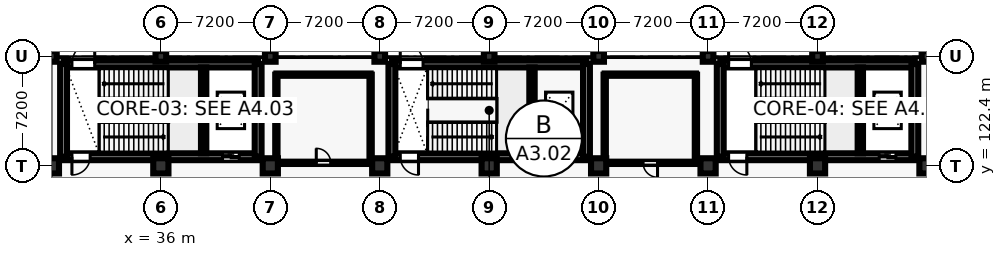
"""IFC4 building model, lengths in metres.
Left out: names, types, materials, properties, quantities, classifications, styles, units other than length and angle.
Written with IfcOpenShell. Run it as: python <this file> out.ifc"""

import sys

from ifc_helpers import new_model, si_unit, direction, frame, frame_2d, origin, origin_2d, place, context, subcontext, project, spatial, rectangle, circle, extrude, element, fill, save


model = new_model("IFC4")
c1 = context("Model", 3, precision=1e-05, world=origin(), true_north=direction((0.0, 1.0)))
c2 = subcontext(c1, "Body", "Model", "MODEL_VIEW")
j1 = project(units=[si_unit("LENGTHUNIT", "METRE"), si_unit("PLANEANGLEUNIT", "RADIAN")], contexts=[c1])
p1 = place(None, origin())
s1 = spatial("IfcSite", under=j1, at=p1, CompositionType="ELEMENT")
p2 = place(p1, origin())
s2 = spatial("IfcBuilding", under=s1, at=p2, CompositionType="ELEMENT")
p3 = place(p2, origin())
s3 = spatial("IfcBuildingStorey", under=s2, at=p3, CompositionType="ELEMENT", Elevation=0.0)
p4 = place(p3, frame((28.8, 122.4, 0.0), z_axis=(0.0, 0.0, 1.0), x_axis=(1.0, 0.0, 0.0)))
e1 = element("IfcColumn", 1, at=p4, inside=s3, PredefinedType="COLUMN", context=c2, shape_type="SweptSolid", body=[
    extrude(circle(Radius=0.5, at=origin_2d()), origin(), (0.0, 0.0, 1.0), 5.4),
])
p5 = place(p3, frame((28.8, 129.6, 0.0), z_axis=(0.0, 0.0, 1.0), x_axis=(1.0, 0.0, 0.0)))
e2 = element("IfcColumn", 2, at=p5, inside=s3, PredefinedType="COLUMN", context=c2, shape_type="SweptSolid", body=[
    extrude(rectangle(XDim=0.7, YDim=0.7, at=origin_2d()), origin(), (0.0, 0.0, 1.0), 5.4),
])
p6 = place(p3, frame((36.0, 122.4, 0.0), z_axis=(0.0, 0.0, 1.0), x_axis=(1.0, 0.0, 0.0)))
e3 = element("IfcColumn", 3, at=p6, inside=s3, PredefinedType="COLUMN", context=c2, shape_type="SweptSolid", body=[
    extrude(circle(Radius=0.5, at=origin_2d()), origin(), (0.0, 0.0, 1.0), 5.4),
])
p7 = place(p3, frame((36.0, 129.6, 0.0), z_axis=(0.0, 0.0, 1.0), x_axis=(1.0, 0.0, 0.0)))
e4 = element("IfcColumn", 4, at=p7, inside=s3, PredefinedType="COLUMN", context=c2, shape_type="SweptSolid", body=[
    extrude(rectangle(XDim=0.7, YDim=0.7, at=origin_2d()), origin(), (0.0, 0.0, 1.0), 5.4),
])
p8 = place(p3, frame((43.2, 122.4, 0.0), z_axis=(0.0, 0.0, 1.0), x_axis=(1.0, 0.0, 0.0)))
e5 = element("IfcColumn", 5, at=p8, inside=s3, PredefinedType="COLUMN", context=c2, shape_type="SweptSolid", body=[
    extrude(circle(Radius=0.5, at=origin_2d()), origin(), (0.0, 0.0, 1.0), 5.4),
])
p9 = place(p3, frame((43.2, 129.6, 0.0), z_axis=(0.0, 0.0, 1.0), x_axis=(1.0, 0.0, 0.0)))
e6 = element("IfcColumn", 6, at=p9, inside=s3, PredefinedType="COLUMN", context=c2, shape_type="SweptSolid", body=[
    extrude(rectangle(XDim=0.7, YDim=0.7, at=origin_2d()), origin(), (0.0, 0.0, 1.0), 5.4),
])
p10 = place(p3, frame((50.4, 122.4, 0.0), z_axis=(0.0, 0.0, 1.0), x_axis=(1.0, 0.0, 0.0)))
e7 = element("IfcColumn", 7, at=p10, inside=s3, PredefinedType="COLUMN", context=c2, shape_type="SweptSolid", body=[
    extrude(circle(Radius=0.5, at=origin_2d()), origin(), (0.0, 0.0, 1.0), 5.4),
])
p11 = place(p3, frame((50.4, 129.6, 0.0), z_axis=(0.0, 0.0, 1.0), x_axis=(1.0, 0.0, 0.0)))
e8 = element("IfcColumn", 8, at=p11, inside=s3, PredefinedType="COLUMN", context=c2, shape_type="SweptSolid", body=[
    extrude(rectangle(XDim=0.7, YDim=0.7, at=origin_2d()), origin(), (0.0, 0.0, 1.0), 5.4),
])
p12 = place(p3, frame((57.6, 122.4, 0.0), z_axis=(0.0, 0.0, 1.0), x_axis=(1.0, 0.0, 0.0)))
e9 = element("IfcColumn", 9, at=p12, inside=s3, PredefinedType="COLUMN", context=c2, shape_type="SweptSolid", body=[
    extrude(circle(Radius=0.5, at=origin_2d()), origin(), (0.0, 0.0, 1.0), 5.4),
])
p13 = place(p3, frame((57.6, 129.6, 0.0), z_axis=(0.0, 0.0, 1.0), x_axis=(1.0, 0.0, 0.0)))
e10 = element("IfcColumn", 10, at=p13, inside=s3, PredefinedType="COLUMN", context=c2, shape_type="SweptSolid", body=[
    extrude(rectangle(XDim=0.7, YDim=0.7, at=origin_2d()), origin(), (0.0, 0.0, 1.0), 5.4),
])
p14 = place(p3, frame((64.8, 122.4, 0.0), z_axis=(0.0, 0.0, 1.0), x_axis=(1.0, 0.0, 0.0)))
e11 = element("IfcColumn", 11, at=p14, inside=s3, PredefinedType="COLUMN", context=c2, shape_type="SweptSolid", body=[
    extrude(circle(Radius=0.5, at=origin_2d()), origin(), (0.0, 0.0, 1.0), 5.4),
])
p15 = place(p3, frame((64.8, 129.6, 0.0), z_axis=(0.0, 0.0, 1.0), x_axis=(1.0, 0.0, 0.0)))
e12 = element("IfcColumn", 12, at=p15, inside=s3, PredefinedType="COLUMN", context=c2, shape_type="SweptSolid", body=[
    extrude(rectangle(XDim=0.7, YDim=0.7, at=origin_2d()), origin(), (0.0, 0.0, 1.0), 5.4),
])
p16 = place(p3, frame((72.0, 122.4, 0.0), z_axis=(0.0, 0.0, 1.0), x_axis=(1.0, 0.0, 0.0)))
e13 = element("IfcColumn", 13, at=p16, inside=s3, PredefinedType="COLUMN", context=c2, shape_type="SweptSolid", body=[
    extrude(circle(Radius=0.5, at=origin_2d()), origin(), (0.0, 0.0, 1.0), 5.4),
])
p17 = place(p3, frame((72.0, 129.6, 0.0), z_axis=(0.0, 0.0, 1.0), x_axis=(1.0, 0.0, 0.0)))
e14 = element("IfcColumn", 14, at=p17, inside=s3, PredefinedType="COLUMN", context=c2, shape_type="SweptSolid", body=[
    extrude(rectangle(XDim=0.7, YDim=0.7, at=origin_2d()), origin(), (0.0, 0.0, 1.0), 5.4),
])
p18 = place(p3, frame((79.2, 122.4, 0.0), z_axis=(0.0, 0.0, 1.0), x_axis=(1.0, 0.0, 0.0)))
e15 = element("IfcColumn", 15, at=p18, inside=s3, PredefinedType="COLUMN", context=c2, shape_type="SweptSolid", body=[
    extrude(circle(Radius=0.5, at=origin_2d()), origin(), (0.0, 0.0, 1.0), 5.4),
])
p19 = place(p3, frame((79.2, 129.6, 0.0), z_axis=(0.0, 0.0, 1.0), x_axis=(1.0, 0.0, 0.0)))
e16 = element("IfcColumn", 16, at=p19, inside=s3, PredefinedType="COLUMN", context=c2, shape_type="SweptSolid", body=[
    extrude(rectangle(XDim=0.7, YDim=0.7, at=origin_2d()), origin(), (0.0, 0.0, 1.0), 5.4),
])
p20 = place(p3, frame((86.4, 122.4, 0.0), z_axis=(0.0, 0.0, 1.0), x_axis=(1.0, 0.0, 0.0)))
e17 = element("IfcColumn", 17, at=p20, inside=s3, PredefinedType="COLUMN", context=c2, shape_type="SweptSolid", body=[
    extrude(circle(Radius=0.5, at=origin_2d()), origin(), (0.0, 0.0, 1.0), 5.4),
])
p21 = place(p3, frame((86.4, 129.6, 0.0), z_axis=(0.0, 0.0, 1.0), x_axis=(1.0, 0.0, 0.0)))
e18 = element("IfcColumn", 18, at=p21, inside=s3, PredefinedType="COLUMN", context=c2, shape_type="SweptSolid", body=[
    extrude(rectangle(XDim=0.7, YDim=0.7, at=origin_2d()), origin(), (0.0, 0.0, 1.0), 5.4),
])
p22 = place(p3, frame((29.6, 123.0, 0.0), z_axis=(0.0, 0.0, 1.0), x_axis=(1.0, 0.0, 0.0)))
e19 = element("IfcWall", 19, at=p22, inside=s3, PredefinedType="SHEAR", context=c2, shape_type="SweptSolid", body=[
    extrude(rectangle(XDim=12.8, YDim=0.45, at=frame_2d((6.4, 0.0))), origin(), (0.0, 0.0, 1.0), 5.06),
])
p23 = place(p22, frame((0.55, 0.0, 0.0)))
e20 = element("IfcOpeningElement", 20, at=p23, cuts=e19, PredefinedType="OPENING", context=c2, shape_type="SweptSolid", body=[
    extrude(rectangle(XDim=1.2, YDim=2.25, at=frame_2d((0.6, 1.125))), frame((0.0, 0.235, 0.0), z_axis=(0.0, -1.0, 0.0), x_axis=(1.0, 0.0, 0.0)), (0.0, 0.0, 1.0), 0.47),
])
p24 = place(p22, frame((10.458, 0.0, 0.0)))
e21 = element("IfcOpeningElement", 21, at=p24, cuts=e19, PredefinedType="OPENING", context=c2, shape_type="SweptSolid", body=[
    extrude(rectangle(XDim=1.1, YDim=2.2, at=frame_2d((0.55, 1.1))), frame((0.0, 0.235, 0.0), z_axis=(0.0, -1.0, 0.0), x_axis=(1.0, 0.0, 0.0)), (0.0, 0.0, 1.0), 0.47),
])
p25 = place(p3, frame((29.6, 129.1, 0.0), z_axis=(0.0, 0.0, 1.0), x_axis=(1.0, 0.0, 0.0)))
e22 = element("IfcWall", 22, at=p25, inside=s3, PredefinedType="SHEAR", context=c2, shape_type="SweptSolid", body=[
    extrude(rectangle(XDim=12.8, YDim=0.45, at=frame_2d((6.4, 0.0))), origin(), (0.0, 0.0, 1.0), 5.06),
])
p26 = place(p25, frame((0.55, 0.0, 0.0)))
e23 = element("IfcOpeningElement", 23, at=p26, cuts=e22, PredefinedType="OPENING", context=c2, shape_type="SweptSolid", body=[
    extrude(rectangle(XDim=1.5, YDim=2.25, at=frame_2d((0.75, 1.125))), frame((0.0, 0.235, 0.0), z_axis=(0.0, -1.0, 0.0), x_axis=(1.0, 0.0, 0.0)), (0.0, 0.0, 1.0), 0.47),
])
for number, where, z_axis, x_axis in (
    (24, (29.6, 123.0, 0.0), (0.0, 0.0, 1.0), (0.0, 1.0, 0.0)),
    (25, (42.4, 123.0, 0.0), (0.0, 0.0, 1.0), (0.0, 1.0, 0.0)),
):
    element("IfcWall", number, at=place(p3, frame(where, z_axis=z_axis, x_axis=x_axis)), inside=s3, PredefinedType="SHEAR", context=c2, shape_type="SweptSolid", body=[
        extrude(rectangle(XDim=6.1, YDim=0.45, at=frame_2d((3.05, 0.0))), origin(), (0.0, 0.0, 1.0), 5.06),
    ])
p27 = place(p3, frame((38.816, 123.225, 0.0), z_axis=(0.0, 0.0, 1.0), x_axis=(0.0, 1.0, 0.0)))
e26 = element("IfcWall", 26, at=p27, inside=s3, PredefinedType="SHEAR", context=c2, shape_type="SweptSolid", body=[
    extrude(rectangle(XDim=5.65, YDim=0.35, at=frame_2d((2.825, 0.0))), origin(), (0.0, 0.0, 1.0), 5.06),
])
p28 = place(p3, frame((72.8, 123.0, 0.0), z_axis=(0.0, 0.0, 1.0), x_axis=(1.0, 0.0, 0.0)))
e27 = element("IfcWall", 27, at=p28, inside=s3, PredefinedType="SHEAR", context=c2, shape_type="SweptSolid", body=[
    extrude(rectangle(XDim=12.8, YDim=0.45, at=frame_2d((6.4, 0.0))), origin(), (0.0, 0.0, 1.0), 5.06),
])
p29 = place(p28, frame((0.55, 0.0, 0.0)))
e28 = element("IfcOpeningElement", 28, at=p29, cuts=e27, PredefinedType="OPENING", context=c2, shape_type="SweptSolid", body=[
    extrude(rectangle(XDim=1.2, YDim=2.25, at=frame_2d((0.6, 1.125))), frame((0.0, 0.235, 0.0), z_axis=(0.0, -1.0, 0.0), x_axis=(1.0, 0.0, 0.0)), (0.0, 0.0, 1.0), 0.47),
])
p30 = place(p28, frame((10.458, 0.0, 0.0)))
e29 = element("IfcOpeningElement", 29, at=p30, cuts=e27, PredefinedType="OPENING", context=c2, shape_type="SweptSolid", body=[
    extrude(rectangle(XDim=1.1, YDim=2.2, at=frame_2d((0.55, 1.1))), frame((0.0, 0.235, 0.0), z_axis=(0.0, -1.0, 0.0), x_axis=(1.0, 0.0, 0.0)), (0.0, 0.0, 1.0), 0.47),
])
p31 = place(p3, frame((72.8, 129.1, 0.0), z_axis=(0.0, 0.0, 1.0), x_axis=(1.0, 0.0, 0.0)))
e30 = element("IfcWall", 30, at=p31, inside=s3, PredefinedType="SHEAR", context=c2, shape_type="SweptSolid", body=[
    extrude(rectangle(XDim=12.8, YDim=0.45, at=frame_2d((6.4, 0.0))), origin(), (0.0, 0.0, 1.0), 5.06),
])
p32 = place(p31, frame((0.55, 0.0, 0.0)))
e31 = element("IfcOpeningElement", 31, at=p32, cuts=e30, PredefinedType="OPENING", context=c2, shape_type="SweptSolid", body=[
    extrude(rectangle(XDim=1.5, YDim=2.25, at=frame_2d((0.75, 1.125))), frame((0.0, 0.235, 0.0), z_axis=(0.0, -1.0, 0.0), x_axis=(1.0, 0.0, 0.0)), (0.0, 0.0, 1.0), 0.47),
])
for number, where, z_axis, x_axis in (
    (32, (72.8, 123.0, 0.0), (0.0, 0.0, 1.0), (0.0, 1.0, 0.0)),
    (33, (85.6, 123.0, 0.0), (0.0, 0.0, 1.0), (0.0, 1.0, 0.0)),
):
    element("IfcWall", number, at=place(p3, frame(where, z_axis=z_axis, x_axis=x_axis)), inside=s3, PredefinedType="SHEAR", context=c2, shape_type="SweptSolid", body=[
        extrude(rectangle(XDim=6.1, YDim=0.45, at=frame_2d((3.05, 0.0))), origin(), (0.0, 0.0, 1.0), 5.06),
    ])
p33 = place(p3, frame((82.016, 123.225, 0.0), z_axis=(0.0, 0.0, 1.0), x_axis=(0.0, 1.0, 0.0)))
e34 = element("IfcWall", 34, at=p33, inside=s3, PredefinedType="SHEAR", context=c2, shape_type="SweptSolid", body=[
    extrude(rectangle(XDim=5.65, YDim=0.35, at=frame_2d((2.825, 0.0))), origin(), (0.0, 0.0, 1.0), 5.06),
])
p34 = place(p3, frame((51.2, 123.0, 0.0), z_axis=(0.0, 0.0, 1.0), x_axis=(1.0, 0.0, 0.0)))
e35 = element("IfcWall", 35, at=p34, inside=s3, PredefinedType="SHEAR", context=c2, shape_type="SweptSolid", body=[
    extrude(rectangle(XDim=12.8, YDim=0.45, at=frame_2d((6.4, 0.0))), origin(), (0.0, 0.0, 1.0), 5.06),
])
p35 = place(p34, frame((0.55, 0.0, 0.0)))
e36 = element("IfcOpeningElement", 36, at=p35, cuts=e35, PredefinedType="OPENING", context=c2, shape_type="SweptSolid", body=[
    extrude(rectangle(XDim=1.2, YDim=2.25, at=frame_2d((0.6, 1.125))), frame((0.0, 0.235, 0.0), z_axis=(0.0, -1.0, 0.0), x_axis=(1.0, 0.0, 0.0)), (0.0, 0.0, 1.0), 0.47),
])
p36 = place(p34, frame((10.458, 0.0, 0.0)))
e37 = element("IfcOpeningElement", 37, at=p36, cuts=e35, PredefinedType="OPENING", context=c2, shape_type="SweptSolid", body=[
    extrude(rectangle(XDim=1.1, YDim=2.2, at=frame_2d((0.55, 1.1))), frame((0.0, 0.235, 0.0), z_axis=(0.0, -1.0, 0.0), x_axis=(1.0, 0.0, 0.0)), (0.0, 0.0, 1.0), 0.47),
])
p37 = place(p3, frame((51.2, 129.1, 0.0), z_axis=(0.0, 0.0, 1.0), x_axis=(1.0, 0.0, 0.0)))
e38 = element("IfcWall", 38, at=p37, inside=s3, PredefinedType="SHEAR", context=c2, shape_type="SweptSolid", body=[
    extrude(rectangle(XDim=12.8, YDim=0.45, at=frame_2d((6.4, 0.0))), origin(), (0.0, 0.0, 1.0), 5.06),
])
p38 = place(p37, frame((0.55, 0.0, 0.0)))
e39 = element("IfcOpeningElement", 39, at=p38, cuts=e38, PredefinedType="OPENING", context=c2, shape_type="SweptSolid", body=[
    extrude(rectangle(XDim=1.5, YDim=2.25, at=frame_2d((0.75, 1.125))), frame((0.0, 0.235, 0.0), z_axis=(0.0, -1.0, 0.0), x_axis=(1.0, 0.0, 0.0)), (0.0, 0.0, 1.0), 0.47),
])
for number, where, z_axis, x_axis in (
    (40, (51.2, 123.0, 0.0), (0.0, 0.0, 1.0), (0.0, 1.0, 0.0)),
    (41, (64.0, 123.0, 0.0), (0.0, 0.0, 1.0), (0.0, 1.0, 0.0)),
):
    element("IfcWall", number, at=place(p3, frame(where, z_axis=z_axis, x_axis=x_axis)), inside=s3, PredefinedType="SHEAR", context=c2, shape_type="SweptSolid", body=[
        extrude(rectangle(XDim=6.1, YDim=0.45, at=frame_2d((3.05, 0.0))), origin(), (0.0, 0.0, 1.0), 5.06),
    ])
p39 = place(p3, frame((60.416, 123.225, 0.0), z_axis=(0.0, 0.0, 1.0), x_axis=(0.0, 1.0, 0.0)))
e42 = element("IfcWall", 42, at=p39, inside=s3, PredefinedType="SHEAR", context=c2, shape_type="SweptSolid", body=[
    extrude(rectangle(XDim=5.65, YDim=0.35, at=frame_2d((2.825, 0.0))), origin(), (0.0, 0.0, 1.0), 5.06),
])
p40 = place(p3, frame((43.6, 122.6, 0.0), z_axis=(0.0, 0.0, 1.0), x_axis=(1.0, 0.0, 0.0)))
e43 = element("IfcWall", 43, at=p40, inside=s3, PredefinedType="PARTITIONING", context=c2, shape_type="SweptSolid", body=[
    extrude(rectangle(XDim=6.2, YDim=0.15, at=frame_2d((3.1, 0.0))), origin(), (0.0, 0.0, 1.0), 4.1),
])
p41 = place(p40, frame((2.625, 0.0, 0.0)))
e44 = element("IfcOpeningElement", 44, at=p41, cuts=e43, PredefinedType="OPENING", context=c2, shape_type="SweptSolid", body=[
    extrude(rectangle(XDim=0.95, YDim=2.15, at=frame_2d((0.475, 1.075))), frame((0.0, 0.085, 0.0), z_axis=(0.0, -1.0, 0.0), x_axis=(1.0, 0.0, 0.0)), (0.0, 0.0, 1.0), 0.17),
])
p42 = place(p3, frame((49.8, 122.6, 0.0), z_axis=(0.0, 0.0, 1.0), x_axis=(0.0, 1.0, 0.0)))
e45 = element("IfcWall", 45, at=p42, inside=s3, PredefinedType="PARTITIONING", context=c2, shape_type="SweptSolid", body=[
    extrude(rectangle(XDim=5.8, YDim=0.15, at=frame_2d((2.9, 0.0))), origin(), (0.0, 0.0, 1.0), 4.1),
])
p43 = place(p3, frame((49.8, 128.4, 0.0), z_axis=(0.0, 0.0, 1.0), x_axis=(-1.0, 0.0, 0.0)))
e46 = element("IfcWall", 46, at=p43, inside=s3, PredefinedType="PARTITIONING", context=c2, shape_type="SweptSolid", body=[
    extrude(rectangle(XDim=6.2, YDim=0.15, at=frame_2d((3.1, 0.0))), origin(), (0.0, 0.0, 1.0), 4.1),
])
p44 = place(p3, frame((43.6, 128.4, 0.0), z_axis=(0.0, 0.0, 1.0), x_axis=(0.0, -1.0, 0.0)))
e47 = element("IfcWall", 47, at=p44, inside=s3, PredefinedType="PARTITIONING", context=c2, shape_type="SweptSolid", body=[
    extrude(rectangle(XDim=5.8, YDim=0.15, at=frame_2d((2.9, 0.0))), origin(), (0.0, 0.0, 1.0), 4.1),
])
p45 = place(p3, frame((65.2, 122.6, 0.0), z_axis=(0.0, 0.0, 1.0), x_axis=(1.0, 0.0, 0.0)))
e48 = element("IfcWall", 48, at=p45, inside=s3, PredefinedType="PARTITIONING", context=c2, shape_type="SweptSolid", body=[
    extrude(rectangle(XDim=6.0, YDim=0.15, at=frame_2d((3.0, 0.0))), origin(), (0.0, 0.0, 1.0), 4.1),
])
p46 = place(p45, frame((2.525, 0.0, 0.0)))
e49 = element("IfcOpeningElement", 49, at=p46, cuts=e48, PredefinedType="OPENING", context=c2, shape_type="SweptSolid", body=[
    extrude(rectangle(XDim=0.95, YDim=2.15, at=frame_2d((0.475, 1.075))), frame((0.0, 0.085, 0.0), z_axis=(0.0, -1.0, 0.0), x_axis=(1.0, 0.0, 0.0)), (0.0, 0.0, 1.0), 0.17),
])
p47 = place(p3, frame((71.2, 122.6, 0.0), z_axis=(0.0, 0.0, 1.0), x_axis=(0.0, 1.0, 0.0)))
e50 = element("IfcWall", 50, at=p47, inside=s3, PredefinedType="PARTITIONING", context=c2, shape_type="SweptSolid", body=[
    extrude(rectangle(XDim=5.8, YDim=0.15, at=frame_2d((2.9, 0.0))), origin(), (0.0, 0.0, 1.0), 4.1),
])
p48 = place(p3, frame((71.2, 128.4, 0.0), z_axis=(0.0, 0.0, 1.0), x_axis=(-1.0, 0.0, 0.0)))
e51 = element("IfcWall", 51, at=p48, inside=s3, PredefinedType="PARTITIONING", context=c2, shape_type="SweptSolid", body=[
    extrude(rectangle(XDim=6.0, YDim=0.15, at=frame_2d((3.0, 0.0))), origin(), (0.0, 0.0, 1.0), 4.1),
])
p49 = place(p3, frame((65.2, 128.4, 0.0), z_axis=(0.0, 0.0, 1.0), x_axis=(0.0, -1.0, 0.0)))
e52 = element("IfcWall", 52, at=p49, inside=s3, PredefinedType="PARTITIONING", context=c2, shape_type="SweptSolid", body=[
    extrude(rectangle(XDim=5.8, YDim=0.15, at=frame_2d((2.9, 0.0))), origin(), (0.0, 0.0, 1.0), 4.1),
])
p50 = place(p23, frame((1.2, 0.0, 0.0), z_axis=(0.0, 0.0, 1.0), x_axis=(-1.0, 0.0, 0.0)))
e53 = element("IfcDoor", 53, at=p50, inside=s3, OperationType="SINGLE_SWING_LEFT", PredefinedType="DOOR", context=c2, shape_type="SweptSolid", body=[
    extrude(rectangle(XDim=1.2, YDim=2.25, at=frame_2d((0.6, 1.125))), frame((0.0, 0.025, 0.0), z_axis=(0.0, -1.0, 0.0), x_axis=(1.0, 0.0, 0.0)), (0.0, 0.0, 1.0), 0.05),
])
fill(e20, e53)
p51 = place(p26, origin())
e54 = element("IfcDoor", 54, at=p51, inside=s3, OperationType="SINGLE_SWING_RIGHT", PredefinedType="DOOR", context=c2, shape_type="SweptSolid", body=[
    extrude(rectangle(XDim=1.5, YDim=2.25, at=frame_2d((0.75, 1.125))), frame((0.0, 0.025, 0.0), z_axis=(0.0, -1.0, 0.0), x_axis=(1.0, 0.0, 0.0)), (0.0, 0.0, 1.0), 0.05),
])
fill(e23, e54)
p52 = place(p24, origin())
e55 = element("IfcDoor", 55, at=p52, inside=s3, OperationType="SLIDING_TO_RIGHT", PredefinedType="DOOR", context=c2, shape_type="SweptSolid", body=[
    extrude(rectangle(XDim=1.1, YDim=2.2, at=frame_2d((0.55, 1.1))), frame((0.0, 0.025, 0.0), z_axis=(0.0, -1.0, 0.0), x_axis=(1.0, 0.0, 0.0)), (0.0, 0.0, 1.0), 0.05),
])
fill(e21, e55)
p53 = place(p29, frame((1.2, 0.0, 0.0), z_axis=(0.0, 0.0, 1.0), x_axis=(-1.0, 0.0, 0.0)))
e56 = element("IfcDoor", 56, at=p53, inside=s3, OperationType="SINGLE_SWING_RIGHT", PredefinedType="DOOR", context=c2, shape_type="SweptSolid", body=[
    extrude(rectangle(XDim=1.2, YDim=2.25, at=frame_2d((0.6, 1.125))), frame((0.0, 0.025, 0.0), z_axis=(0.0, -1.0, 0.0), x_axis=(1.0, 0.0, 0.0)), (0.0, 0.0, 1.0), 0.05),
])
fill(e28, e56)
p54 = place(p32, origin())
e57 = element("IfcDoor", 57, at=p54, inside=s3, OperationType="SINGLE_SWING_LEFT", PredefinedType="DOOR", context=c2, shape_type="SweptSolid", body=[
    extrude(rectangle(XDim=1.5, YDim=2.25, at=frame_2d((0.75, 1.125))), frame((0.0, 0.025, 0.0), z_axis=(0.0, -1.0, 0.0), x_axis=(1.0, 0.0, 0.0)), (0.0, 0.0, 1.0), 0.05),
])
fill(e31, e57)
p55 = place(p30, origin())
e58 = element("IfcDoor", 58, at=p55, inside=s3, OperationType="SLIDING_TO_RIGHT", PredefinedType="DOOR", context=c2, shape_type="SweptSolid", body=[
    extrude(rectangle(XDim=1.1, YDim=2.2, at=frame_2d((0.55, 1.1))), frame((0.0, 0.025, 0.0), z_axis=(0.0, -1.0, 0.0), x_axis=(1.0, 0.0, 0.0)), (0.0, 0.0, 1.0), 0.05),
])
fill(e29, e58)
p56 = place(p35, frame((1.2, 0.0, 0.0), z_axis=(0.0, 0.0, 1.0), x_axis=(-1.0, 0.0, 0.0)))
e59 = element("IfcDoor", 59, at=p56, inside=s3, OperationType="SINGLE_SWING_RIGHT", PredefinedType="DOOR", context=c2, shape_type="SweptSolid", body=[
    extrude(rectangle(XDim=1.2, YDim=2.25, at=frame_2d((0.6, 1.125))), frame((0.0, 0.025, 0.0), z_axis=(0.0, -1.0, 0.0), x_axis=(1.0, 0.0, 0.0)), (0.0, 0.0, 1.0), 0.05),
])
fill(e36, e59)
p57 = place(p38, origin())
e60 = element("IfcDoor", 60, at=p57, inside=s3, OperationType="SINGLE_SWING_LEFT", PredefinedType="DOOR", context=c2, shape_type="SweptSolid", body=[
    extrude(rectangle(XDim=1.5, YDim=2.25, at=frame_2d((0.75, 1.125))), frame((0.0, 0.025, 0.0), z_axis=(0.0, -1.0, 0.0), x_axis=(1.0, 0.0, 0.0)), (0.0, 0.0, 1.0), 0.05),
])
fill(e39, e60)
p58 = place(p36, origin())
e61 = element("IfcDoor", 61, at=p58, inside=s3, OperationType="SLIDING_TO_LEFT", PredefinedType="DOOR", context=c2, shape_type="SweptSolid", body=[
    extrude(rectangle(XDim=1.1, YDim=2.2, at=frame_2d((0.55, 1.1))), frame((0.0, 0.025, 0.0), z_axis=(0.0, -1.0, 0.0), x_axis=(1.0, 0.0, 0.0)), (0.0, 0.0, 1.0), 0.05),
])
fill(e37, e61)
p59 = place(p41, origin())
e62 = element("IfcDoor", 62, at=p59, inside=s3, OperationType="SINGLE_SWING_LEFT", PredefinedType="DOOR", context=c2, shape_type="SweptSolid", body=[
    extrude(rectangle(XDim=0.95, YDim=2.15, at=frame_2d((0.475, 1.075))), frame((0.0, 0.025, 0.0), z_axis=(0.0, -1.0, 0.0), x_axis=(1.0, 0.0, 0.0)), (0.0, 0.0, 1.0), 0.05),
])
fill(e44, e62)
p60 = place(p46, frame((0.95, 0.0, 0.0), z_axis=(0.0, 0.0, 1.0), x_axis=(-1.0, 0.0, 0.0)))
e63 = element("IfcDoor", 63, at=p60, inside=s3, OperationType="SINGLE_SWING_RIGHT", PredefinedType="DOOR", context=c2, shape_type="SweptSolid", body=[
    extrude(rectangle(XDim=0.95, YDim=2.15, at=frame_2d((0.475, 1.075))), frame((0.0, 0.025, 0.0), z_axis=(0.0, -1.0, 0.0), x_axis=(1.0, 0.0, 0.0)), (0.0, 0.0, 1.0), 0.05),
])
fill(e49, e63)
save(model, sys.argv[1])
